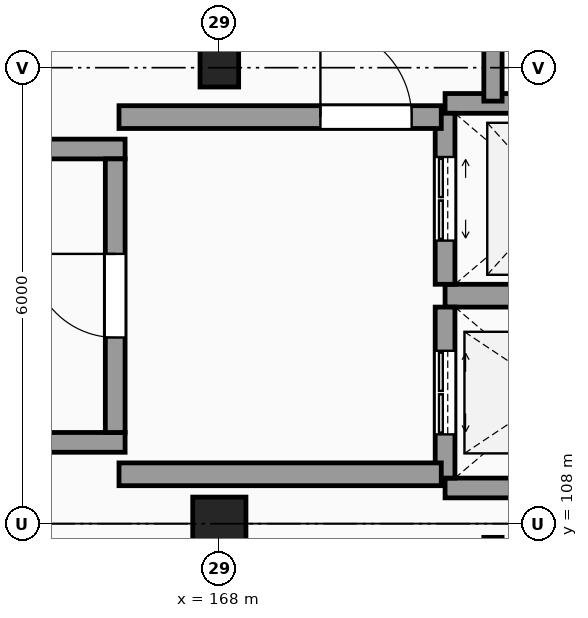
"""IFC4 building model, lengths in metres.
Left out: names, types, materials, properties, quantities, classifications, styles, units other than length and angle.
Written with IfcOpenShell. Run it as: python <this file> out.ifc"""

import sys

from ifc_helpers import new_model, si_unit, direction, frame, frame_2d, origin, origin_2d, place, context, subcontext, project, spatial, rectangle, circle, hollow_circle, extrude, element, fill, save


model = new_model("IFC4")
c1 = context("Model", 3, precision=1e-05, world=origin(), true_north=direction((0.0, 1.0)))
c2 = subcontext(c1, "Body", "Model", "MODEL_VIEW")
j1 = project(units=[si_unit("LENGTHUNIT", "METRE"), si_unit("PLANEANGLEUNIT", "RADIAN")], contexts=[c1])
p1 = place(None, origin())
s1 = spatial("IfcSite", under=j1, at=p1, CompositionType="ELEMENT")
p2 = place(p1, origin())
s2 = spatial("IfcBuilding", under=s1, at=p2, CompositionType="ELEMENT")
p3 = place(p2, frame((0.0, 0.0, 15.0)))
s3 = spatial("IfcBuildingStorey", under=s2, at=p3, CompositionType="ELEMENT", Elevation=15.0)
p4 = place(p3, frame((168.0, 108.0, 0.0), z_axis=(0.0, 0.0, 1.0), x_axis=(1.0, 0.0, 0.0)))
e1 = element("IfcColumn", 1, at=p4, inside=s3, PredefinedType="COLUMN", context=c2, shape_type="SweptSolid", body=[
    extrude(circle(Radius=0.35, at=origin_2d()), origin(), (0.0, 0.0, 1.0), 4.8),
])
p5 = place(p3, frame((168.0, 114.0, 0.0), z_axis=(0.0, 0.0, 1.0), x_axis=(1.0, 0.0, 0.0)))
e2 = element("IfcColumn", 2, at=p5, inside=s3, PredefinedType="COLUMN", context=c2, shape_type="SweptSolid", body=[
    extrude(hollow_circle(Radius=0.254, WallThickness=0.025, at=origin_2d()), origin(), (0.0, 0.0, 1.0), 4.8),
])
for number, where, z_axis, x_axis in (
    (3, (156.04, 109.07, 0.0), (0.0, 0.0, 1.0), (1.0, 0.0, 0.0)),
    (4, (156.04, 112.93, 0.0), (0.0, 0.0, 1.0), (1.0, 0.0, 0.0)),
):
    element("IfcWall", number, at=place(p3, frame(where, z_axis=z_axis, x_axis=x_axis)), inside=s3, PredefinedType="SHEAR", context=c2, shape_type="SweptSolid", body=[
        extrude(rectangle(XDim=10.72, YDim=0.26, at=frame_2d((5.36, 0.0))), origin(), (0.0, 0.0, 1.0), 4.8),
    ])
p6 = place(p3, frame((166.63, 109.2, 0.0), z_axis=(0.0, 0.0, 1.0), x_axis=(0.0, 1.0, 0.0)))
e5 = element("IfcWall", 5, at=p6, inside=s3, PredefinedType="SHEAR", context=c2, shape_type="SweptSolid", body=[
    extrude(rectangle(XDim=3.6, YDim=0.26, at=frame_2d((1.8, 0.0))), origin(), (0.0, 0.0, 1.0), 4.8),
])
p7 = place(p6, frame((1.25, 0.0, 0.0)))
e6 = element("IfcOpeningElement", 6, at=p7, cuts=e5, PredefinedType="OPENING", context=c2, shape_type="SweptSolid", body=[
    extrude(rectangle(XDim=1.1, YDim=2.15, at=frame_2d((0.55, 1.075))), frame((0.0, 0.14, 0.0), z_axis=(0.0, -1.0, 0.0), x_axis=(1.0, 0.0, 0.0)), (0.0, 0.0, 1.0), 0.28),
])
p8 = place(p3, frame((170.97, 108.47, 0.0), z_axis=(0.0, 0.0, 1.0), x_axis=(1.0, 0.0, 0.0)))
e7 = element("IfcWall", 7, at=p8, inside=s3, PredefinedType="SHEAR", context=c2, shape_type="SweptSolid", body=[
    extrude(rectangle(XDim=2.91, YDim=0.26, at=frame_2d((1.455, 0.0))), origin(), (0.0, 0.0, 1.0), 4.8),
])
p9 = place(p3, frame((170.97, 111.0, 0.0), z_axis=(0.0, 0.0, 1.0), x_axis=(1.0, 0.0, 0.0)))
e8 = element("IfcWall", 8, at=p9, inside=s3, PredefinedType="SHEAR", context=c2, shape_type="SweptSolid", body=[
    extrude(rectangle(XDim=2.91, YDim=0.3, at=frame_2d((1.455, 0.0))), origin(), (0.0, 0.0, 1.0), 4.8),
])
p10 = place(p3, frame((170.97, 108.6, 0.0), z_axis=(0.0, 0.0, 1.0), x_axis=(0.0, 1.0, 0.0)))
e9 = element("IfcWall", 9, at=p10, inside=s3, PredefinedType="SHEAR", context=c2, shape_type="SweptSolid", body=[
    extrude(rectangle(XDim=2.25, YDim=0.26, at=frame_2d((1.125, 0.0))), origin(), (0.0, 0.0, 1.0), 4.8),
])
p11 = place(p10, frame((0.575, 0.0, 0.0)))
e10 = element("IfcOpeningElement", 10, at=p11, cuts=e9, PredefinedType="OPENING", context=c2, shape_type="SweptSolid", body=[
    extrude(rectangle(XDim=1.1, YDim=2.2, at=frame_2d((0.55, 1.1))), frame((0.0, 0.14, 0.0), z_axis=(0.0, -1.0, 0.0), x_axis=(1.0, 0.0, 0.0)), (0.0, 0.0, 1.0), 0.28),
])
p12 = place(p3, frame((170.97, 113.53, 0.0), z_axis=(0.0, 0.0, 1.0), x_axis=(1.0, 0.0, 0.0)))
e11 = element("IfcWall", 11, at=p12, inside=s3, PredefinedType="SHEAR", context=c2, shape_type="SweptSolid", body=[
    extrude(rectangle(XDim=2.91, YDim=0.26, at=frame_2d((1.455, 0.0))), origin(), (0.0, 0.0, 1.0), 4.8),
])
p13 = place(p3, frame((170.97, 111.15, 0.0), z_axis=(0.0, 0.0, 1.0), x_axis=(0.0, 1.0, 0.0)))
e12 = element("IfcWall", 12, at=p13, inside=s3, PredefinedType="SHEAR", context=c2, shape_type="SweptSolid", body=[
    extrude(rectangle(XDim=2.25, YDim=0.26, at=frame_2d((1.125, 0.0))), origin(), (0.0, 0.0, 1.0), 4.8),
])
p14 = place(p13, frame((0.575, 0.0, 0.0)))
e13 = element("IfcOpeningElement", 13, at=p14, cuts=e12, PredefinedType="OPENING", context=c2, shape_type="SweptSolid", body=[
    extrude(rectangle(XDim=1.1, YDim=2.2, at=frame_2d((0.55, 1.1))), frame((0.0, 0.14, 0.0), z_axis=(0.0, -1.0, 0.0), x_axis=(1.0, 0.0, 0.0)), (0.0, 0.0, 1.0), 0.28),
])
p15 = place(p3, frame((166.68, 113.35, 0.0), z_axis=(0.0, 0.0, 1.0), x_axis=(1.0, 0.0, 0.0)))
e14 = element("IfcWall", 14, at=p15, inside=s3, PredefinedType="SHEAR", context=c2, shape_type="SweptSolid", body=[
    extrude(rectangle(XDim=4.24, YDim=0.3, at=frame_2d((2.12, 0.0))), origin(), (0.0, 0.0, 1.0), 4.8),
])
p16 = place(p15, frame((2.65, 0.0, 0.0)))
e15 = element("IfcOpeningElement", 15, at=p16, cuts=e14, PredefinedType="OPENING", context=c2, shape_type="SweptSolid", body=[
    extrude(rectangle(XDim=1.2, YDim=2.2, at=frame_2d((0.6, 1.1))), frame((0.0, 0.16, 0.0), z_axis=(0.0, -1.0, 0.0), x_axis=(1.0, 0.0, 0.0)), (0.0, 0.0, 1.0), 0.32),
])
p17 = place(p3, frame((166.68, 108.65, 0.0), z_axis=(0.0, 0.0, 1.0), x_axis=(1.0, 0.0, 0.0)))
e16 = element("IfcWall", 16, at=p17, inside=s3, PredefinedType="SHEAR", context=c2, shape_type="SweptSolid", body=[
    extrude(rectangle(XDim=4.24, YDim=0.3, at=frame_2d((2.12, 0.0))), origin(), (0.0, 0.0, 1.0), 4.8),
])
p18 = place(p3, frame((171.6, 36.045, 0.0), z_axis=(0.0, 0.0, 1.0), x_axis=(0.0, 1.0, 0.0)))
e17 = element("IfcWall", 17, at=p18, inside=s3, PredefinedType="PARTITIONING", context=c2, shape_type="SweptSolid", body=[
    extrude(rectangle(XDim=71.775, YDim=0.24, at=frame_2d((35.888, 0.0))), origin(), (0.0, 0.0, 1.0), 4.45),
])
p19 = place(p18, frame((8.355, 0.0, 0.0)))
e18 = element("IfcOpeningElement", 18, at=p19, cuts=e17, PredefinedType="OPENING", context=c2, shape_type="SweptSolid", body=[
    extrude(rectangle(XDim=1.2, YDim=2.2, at=frame_2d((0.6, 1.1))), frame((0.0, 0.13, 0.0), z_axis=(0.0, -1.0, 0.0), x_axis=(1.0, 0.0, 0.0)), (0.0, 0.0, 1.0), 0.26),
])
p20 = place(p18, frame((32.405, 0.0, 0.0)))
e19 = element("IfcOpeningElement", 19, at=p20, cuts=e17, PredefinedType="OPENING", context=c2, shape_type="SweptSolid", body=[
    extrude(rectangle(XDim=1.1, YDim=2.15, at=frame_2d((0.55, 1.075))), frame((0.0, 0.13, 0.0), z_axis=(0.0, -1.0, 0.0), x_axis=(1.0, 0.0, 0.0)), (0.0, 0.0, 1.0), 0.26),
])
p21 = place(p3, frame((171.6, 113.56, 0.0), z_axis=(0.0, 0.0, 1.0), x_axis=(0.0, 1.0, 0.0)))
e20 = element("IfcWall", 20, at=p21, inside=s3, PredefinedType="PARTITIONING", context=c2, shape_type="SweptSolid", body=[
    extrude(rectangle(XDim=3.94, YDim=0.24, at=frame_2d((1.97, 0.0))), origin(), (0.0, 0.0, 1.0), 4.45),
])
p22 = place(p7, origin())
e21 = element("IfcDoor", 21, at=p22, inside=s3, OperationType="SINGLE_SWING_RIGHT", PredefinedType="DOOR", context=c2, shape_type="SweptSolid", body=[
    extrude(rectangle(XDim=1.1, YDim=2.15, at=frame_2d((0.55, 1.075))), frame((0.0, 0.025, 0.0), z_axis=(0.0, -1.0, 0.0), x_axis=(1.0, 0.0, 0.0)), (0.0, 0.0, 1.0), 0.05),
])
fill(e6, e21)
p23 = place(p11, origin())
e22 = element("IfcDoor", 22, at=p23, inside=s3, OperationType="DOUBLE_DOOR_SLIDING", PredefinedType="DOOR", context=c2, shape_type="SweptSolid", body=[
    extrude(rectangle(XDim=1.1, YDim=2.2, at=frame_2d((0.55, 1.1))), frame((0.0, 0.025, 0.0), z_axis=(0.0, -1.0, 0.0), x_axis=(1.0, 0.0, 0.0)), (0.0, 0.0, 1.0), 0.05),
])
fill(e10, e22)
p24 = place(p14, origin())
e23 = element("IfcDoor", 23, at=p24, inside=s3, OperationType="DOUBLE_DOOR_SLIDING", PredefinedType="DOOR", context=c2, shape_type="SweptSolid", body=[
    extrude(rectangle(XDim=1.1, YDim=2.2, at=frame_2d((0.55, 1.1))), frame((0.0, 0.025, 0.0), z_axis=(0.0, -1.0, 0.0), x_axis=(1.0, 0.0, 0.0)), (0.0, 0.0, 1.0), 0.05),
])
fill(e13, e23)
p25 = place(p16, origin())
e24 = element("IfcDoor", 24, at=p25, inside=s3, OperationType="SINGLE_SWING_LEFT", PredefinedType="DOOR", context=c2, shape_type="SweptSolid", body=[
    extrude(rectangle(XDim=1.2, YDim=2.2, at=frame_2d((0.6, 1.1))), frame((0.0, 0.025, 0.0), z_axis=(0.0, -1.0, 0.0), x_axis=(1.0, 0.0, 0.0)), (0.0, 0.0, 1.0), 0.05),
])
fill(e15, e24)
save(model, sys.argv[1])
